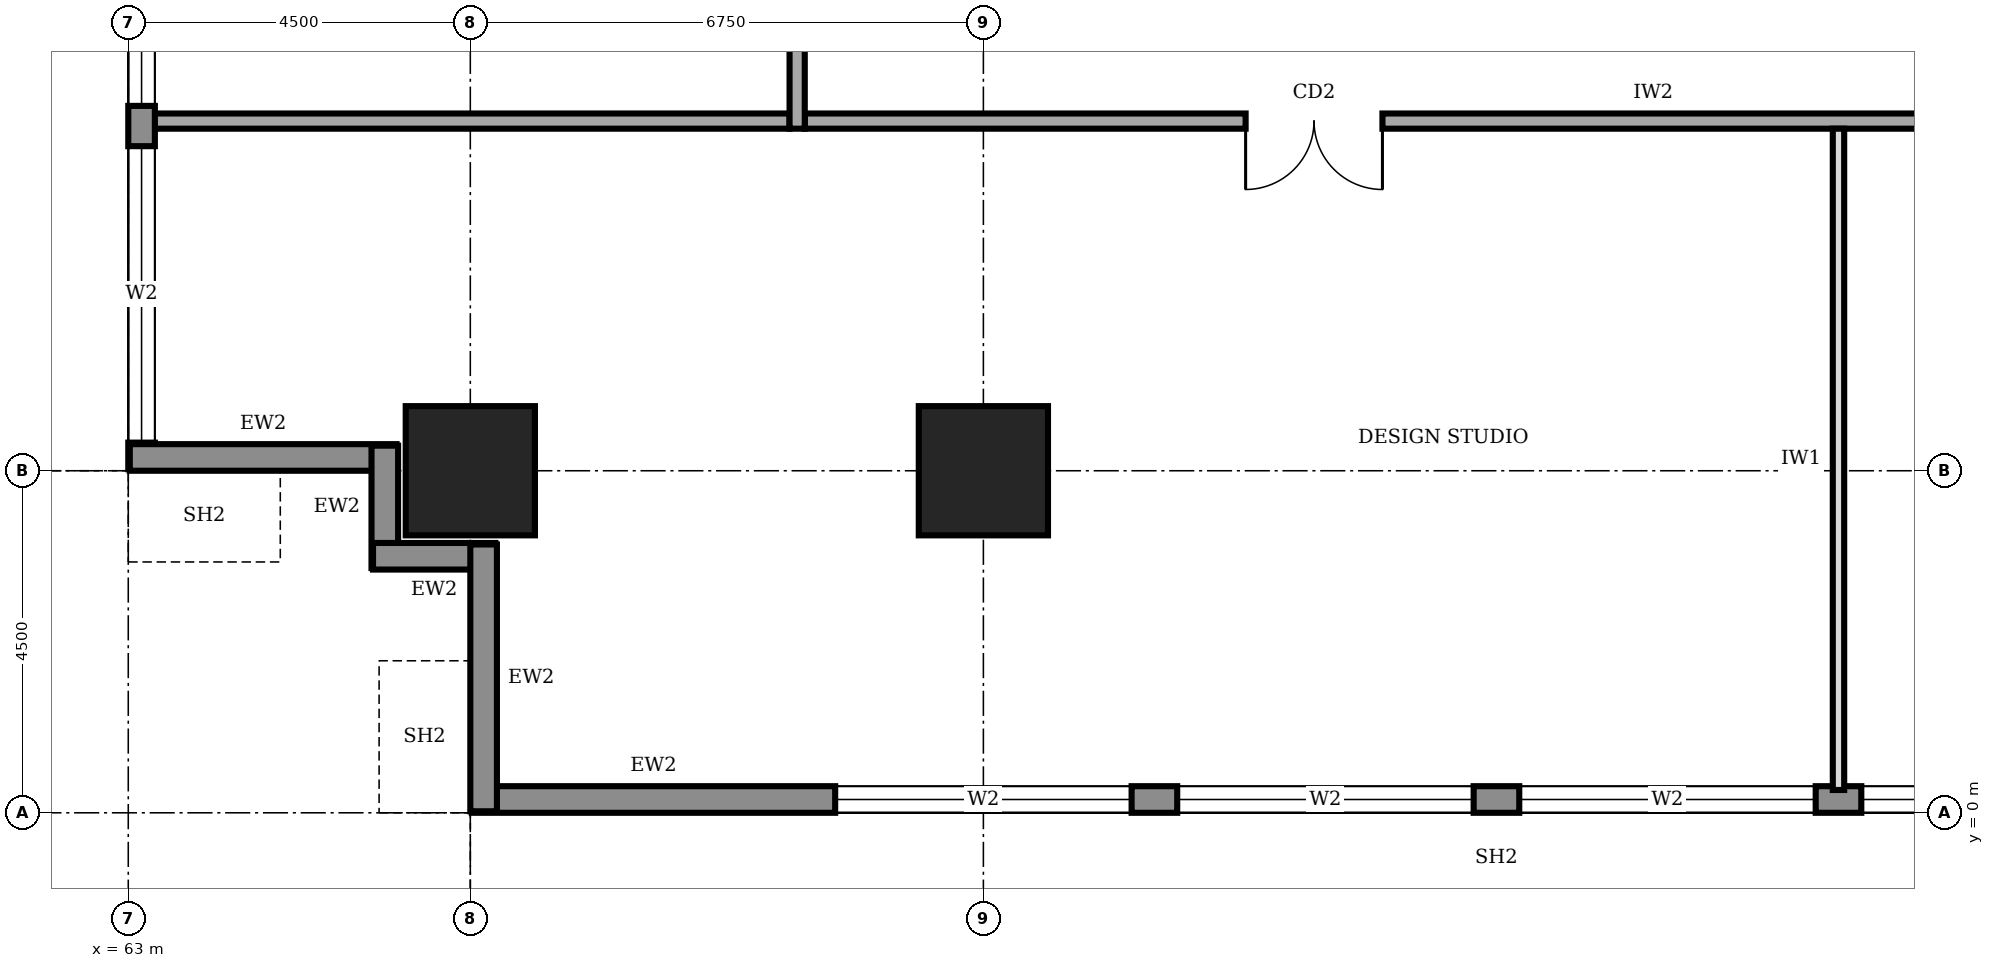
"""IFC4 building model, lengths in metres.
Left out: names, types, materials, properties, quantities, classifications, styles, units other than length and angle.
Written with IfcOpenShell. Run it as: python <this file> out.ifc"""

import sys

from ifc_helpers import new_model, si_unit, direction, frame, frame_2d, origin, origin_2d, place, context, subcontext, project, spatial, rectangle, extrude, element, fill, save


model = new_model("IFC4")
c1 = context("Model", 3, precision=1e-05, world=origin(), true_north=direction((0.0, 1.0)))
c2 = subcontext(c1, "Body", "Model", "MODEL_VIEW")
j1 = project(units=[si_unit("LENGTHUNIT", "METRE"), si_unit("PLANEANGLEUNIT", "RADIAN")], contexts=[c1])
p1 = place(None, origin())
s1 = spatial("IfcSite", under=j1, at=p1, CompositionType="ELEMENT")
p2 = place(p1, origin())
s2 = spatial("IfcBuilding", under=s1, at=p2, CompositionType="ELEMENT")
p3 = place(p2, frame((0.0, 0.0, 49.0)))
s3 = spatial("IfcBuildingStorey", under=s2, at=p3, CompositionType="ELEMENT", Elevation=49.0)
for number, where, z_axis, x_axis in (
    (1, (67.5, 4.5, 0.0), (0.0, 0.0, 1.0), (1.0, 0.0, 0.0)),
    (2, (74.25, 4.5, 0.0), (0.0, 0.0, 1.0), (1.0, 0.0, 0.0)),
):
    element("IfcColumn", number, at=place(p3, frame(where, z_axis=z_axis, x_axis=x_axis)), inside=s3, PredefinedType="COLUMN", context=c2, shape_type="SweptSolid", body=[
        extrude(rectangle(XDim=1.7, YDim=1.7, at=origin_2d()), origin(), (0.0, 0.0, 1.0), 4.0),
    ])
p4 = place(p3, frame((67.52, 0.175, 0.0), z_axis=(0.0, 0.0, 1.0), x_axis=(1.0, 0.0, 0.0)))
e3 = element("IfcWall", 3, at=p4, inside=s3, PredefinedType="STANDARD", context=c2, shape_type="SweptSolid", body=[
    extrude(rectangle(XDim=26.96, YDim=0.35, at=frame_2d((13.48, 0.0))), origin(), (0.0, 0.0, 1.0), 3.75),
])
p5 = place(p4, frame((4.78, 0.0, 0.6)))
e4 = element("IfcOpeningElement", 4, at=p5, cuts=e3, PredefinedType="OPENING", context=c2, shape_type="SweptSolid", body=[
    extrude(rectangle(XDim=3.9, YDim=2.6, at=frame_2d((1.95, 1.3))), frame((0.0, 0.185, 0.0), z_axis=(0.0, -1.0, 0.0), x_axis=(1.0, 0.0, 0.0)), (0.0, 0.0, 1.0), 0.37),
])
p6 = place(p4, frame((9.28, 0.0, 0.6)))
e5 = element("IfcOpeningElement", 5, at=p6, cuts=e3, PredefinedType="OPENING", context=c2, shape_type="SweptSolid", body=[
    extrude(rectangle(XDim=3.9, YDim=2.6, at=frame_2d((1.95, 1.3))), frame((0.0, 0.185, 0.0), z_axis=(0.0, -1.0, 0.0), x_axis=(1.0, 0.0, 0.0)), (0.0, 0.0, 1.0), 0.37),
])
p7 = place(p4, frame((13.78, 0.0, 0.6)))
e6 = element("IfcOpeningElement", 6, at=p7, cuts=e3, PredefinedType="OPENING", context=c2, shape_type="SweptSolid", body=[
    extrude(rectangle(XDim=3.9, YDim=2.6, at=frame_2d((1.95, 1.3))), frame((0.0, 0.185, 0.0), z_axis=(0.0, -1.0, 0.0), x_axis=(1.0, 0.0, 0.0)), (0.0, 0.0, 1.0), 0.37),
])
p8 = place(p4, frame((18.28, 0.0, 0.6)))
e7 = element("IfcOpeningElement", 7, at=p8, cuts=e3, PredefinedType="OPENING", context=c2, shape_type="SweptSolid", body=[
    extrude(rectangle(XDim=3.9, YDim=2.6, at=frame_2d((1.95, 1.3))), frame((0.0, 0.185, 0.0), z_axis=(0.0, -1.0, 0.0), x_axis=(1.0, 0.0, 0.0)), (0.0, 0.0, 1.0), 0.37),
])
p9 = place(p4, frame((22.71, 0.0, 0.6)))
e8 = element("IfcOpeningElement", 8, at=p9, cuts=e3, PredefinedType="OPENING", context=c2, shape_type="SweptSolid", body=[
    extrude(rectangle(XDim=3.9, YDim=2.6, at=frame_2d((1.95, 1.3))), frame((0.0, 0.185, 0.0), z_axis=(0.0, -1.0, 0.0), x_axis=(1.0, 0.0, 0.0)), (0.0, 0.0, 1.0), 0.37),
])
p10 = place(p3, frame((63.175, 35.98, 0.0), z_axis=(0.0, 0.0, 1.0), x_axis=(0.0, -1.0, 0.0)))
e9 = element("IfcWall", 9, at=p10, inside=s3, PredefinedType="STANDARD", context=c2, shape_type="SweptSolid", body=[
    extrude(rectangle(XDim=31.46, YDim=0.35, at=frame_2d((15.73, 0.0))), origin(), (0.0, 0.0, 1.0), 3.75),
])
p11 = place(p10, frame((27.21, 0.0, 0.6)))
e10 = element("IfcOpeningElement", 10, at=p11, cuts=e9, PredefinedType="OPENING", context=c2, shape_type="SweptSolid", body=[
    extrude(rectangle(XDim=3.9, YDim=2.6, at=frame_2d((1.95, 1.3))), frame((0.0, 0.185, 0.0), z_axis=(0.0, -1.0, 0.0), x_axis=(1.0, 0.0, 0.0)), (0.0, 0.0, 1.0), 0.37),
])
p12 = place(p10, frame((22.78, 0.0, 0.6)))
e11 = element("IfcOpeningElement", 11, at=p12, cuts=e9, PredefinedType="OPENING", context=c2, shape_type="SweptSolid", body=[
    extrude(rectangle(XDim=3.9, YDim=2.6, at=frame_2d((1.95, 1.3))), frame((0.0, 0.185, 0.0), z_axis=(0.0, -1.0, 0.0), x_axis=(1.0, 0.0, 0.0)), (0.0, 0.0, 1.0), 0.37),
])
p13 = place(p10, frame((18.28, 0.0, 0.6)))
e12 = element("IfcOpeningElement", 12, at=p13, cuts=e9, PredefinedType="OPENING", context=c2, shape_type="SweptSolid", body=[
    extrude(rectangle(XDim=3.9, YDim=2.6, at=frame_2d((1.95, 1.3))), frame((0.0, 0.185, 0.0), z_axis=(0.0, -1.0, 0.0), x_axis=(1.0, 0.0, 0.0)), (0.0, 0.0, 1.0), 0.37),
])
p14 = place(p10, frame((13.78, 0.0, 0.6)))
e13 = element("IfcOpeningElement", 13, at=p14, cuts=e9, PredefinedType="OPENING", context=c2, shape_type="SweptSolid", body=[
    extrude(rectangle(XDim=3.9, YDim=2.6, at=frame_2d((1.95, 1.3))), frame((0.0, 0.185, 0.0), z_axis=(0.0, -1.0, 0.0), x_axis=(1.0, 0.0, 0.0)), (0.0, 0.0, 1.0), 0.37),
])
p15 = place(p10, frame((9.28, 0.0, 0.6)))
e14 = element("IfcOpeningElement", 14, at=p15, cuts=e9, PredefinedType="OPENING", context=c2, shape_type="SweptSolid", body=[
    extrude(rectangle(XDim=3.9, YDim=2.6, at=frame_2d((1.95, 1.3))), frame((0.0, 0.185, 0.0), z_axis=(0.0, -1.0, 0.0), x_axis=(1.0, 0.0, 0.0)), (0.0, 0.0, 1.0), 0.37),
])
p16 = place(p10, frame((4.78, 0.0, 0.6)))
e15 = element("IfcOpeningElement", 15, at=p16, cuts=e9, PredefinedType="OPENING", context=c2, shape_type="SweptSolid", body=[
    extrude(rectangle(XDim=3.9, YDim=2.6, at=frame_2d((1.95, 1.3))), frame((0.0, 0.185, 0.0), z_axis=(0.0, -1.0, 0.0), x_axis=(1.0, 0.0, 0.0)), (0.0, 0.0, 1.0), 0.37),
])
p17 = place(p3, frame((63.02, 4.675, 0.0), z_axis=(0.0, 0.0, 1.0), x_axis=(1.0, 0.0, 0.0)))
e16 = element("IfcWall", 16, at=p17, inside=s3, PredefinedType="STANDARD", context=c2, shape_type="SweptSolid", body=[
    extrude(rectangle(XDim=3.51, YDim=0.35, at=frame_2d((1.755, 0.0))), origin(), (0.0, 0.0, 1.0), 2.85),
])
for number, where, z_axis, x_axis in (
    (17, (66.375, 4.83, 0.0), (0.0, 0.0, 1.0), (0.0, -1.0, 0.0)),
    (18, (66.22, 3.375, 0.0), (0.0, 0.0, 1.0), (1.0, 0.0, 0.0)),
):
    element("IfcWall", number, at=place(p3, frame(where, z_axis=z_axis, x_axis=x_axis)), inside=s3, PredefinedType="STANDARD", context=c2, shape_type="SweptSolid", body=[
        extrude(rectangle(XDim=1.61, YDim=0.35, at=frame_2d((0.805, 0.0))), origin(), (0.0, 0.0, 1.0), 3.75),
    ])
p18 = place(p3, frame((67.675, 3.53, 0.0), z_axis=(0.0, 0.0, 1.0), x_axis=(0.0, -1.0, 0.0)))
e19 = element("IfcWall", 19, at=p18, inside=s3, PredefinedType="STANDARD", context=c2, shape_type="SweptSolid", body=[
    extrude(rectangle(XDim=3.51, YDim=0.35, at=frame_2d((1.755, 0.0))), origin(), (0.0, 0.0, 1.0), 2.85),
])
p19 = place(p3, frame((71.9, 9.1, 0.0), z_axis=(0.0, 0.0, 1.0), x_axis=(1.0, 0.0, 0.0)))
e20 = element("IfcWall", 20, at=p19, inside=s3, PredefinedType="SOLIDWALL", context=c2, shape_type="SweptSolid", body=[
    extrude(rectangle(XDim=17.65, YDim=0.2, at=frame_2d((8.825, 0.0))), origin(), (0.0, 0.0, 1.0), 3.75),
])
p20 = place(p19, frame((5.8, 0.0, 0.0)))
e21 = element("IfcOpeningElement", 21, at=p20, cuts=e20, PredefinedType="OPENING", context=c2, shape_type="SweptSolid", body=[
    extrude(rectangle(XDim=1.8, YDim=2.1, at=frame_2d((0.9, 1.05))), frame((0.0, 0.11, 0.0), z_axis=(0.0, -1.0, 0.0), x_axis=(1.0, 0.0, 0.0)), (0.0, 0.0, 1.0), 0.22),
])
p21 = place(p19, frame((14.725, 0.0, 0.0)))
e22 = element("IfcOpeningElement", 22, at=p21, cuts=e20, PredefinedType="OPENING", context=c2, shape_type="SweptSolid", body=[
    extrude(rectangle(XDim=1.8, YDim=2.1, at=frame_2d((0.9, 1.05))), frame((0.0, 0.11, 0.0), z_axis=(0.0, -1.0, 0.0), x_axis=(1.0, 0.0, 0.0)), (0.0, 0.0, 1.0), 0.22),
])
p22 = place(p3, frame((71.8, 32.05, 0.0), z_axis=(0.0, 0.0, 1.0), x_axis=(0.0, -1.0, 0.0)))
e23 = element("IfcWall", 23, at=p22, inside=s3, PredefinedType="SOLIDWALL", context=c2, shape_type="SweptSolid", body=[
    extrude(rectangle(XDim=23.05, YDim=0.2, at=frame_2d((11.525, 0.0))), origin(), (0.0, 0.0, 1.0), 3.75),
])
p23 = place(p22, frame((18.05, 0.0, 0.0)))
e24 = element("IfcOpeningElement", 24, at=p23, cuts=e23, PredefinedType="OPENING", context=c2, shape_type="SweptSolid", body=[
    extrude(rectangle(XDim=1.0, YDim=2.1, at=frame_2d((0.5, 1.05))), frame((0.0, 0.11, 0.0), z_axis=(0.0, -1.0, 0.0), x_axis=(1.0, 0.0, 0.0)), (0.0, 0.0, 1.0), 0.22),
])
p24 = place(p22, frame((11.3, 0.0, 0.0)))
e25 = element("IfcOpeningElement", 25, at=p24, cuts=e23, PredefinedType="OPENING", context=c2, shape_type="SweptSolid", body=[
    extrude(rectangle(XDim=1.0, YDim=2.1, at=frame_2d((0.5, 1.05))), frame((0.0, 0.11, 0.0), z_axis=(0.0, -1.0, 0.0), x_axis=(1.0, 0.0, 0.0)), (0.0, 0.0, 1.0), 0.22),
])
p25 = place(p22, frame((4.175, 0.0, 0.0)))
e26 = element("IfcOpeningElement", 26, at=p25, cuts=e23, PredefinedType="OPENING", context=c2, shape_type="SweptSolid", body=[
    extrude(rectangle(XDim=1.0, YDim=2.1, at=frame_2d((0.5, 1.05))), frame((0.0, 0.11, 0.0), z_axis=(0.0, -1.0, 0.0), x_axis=(1.0, 0.0, 0.0)), (0.0, 0.0, 1.0), 0.22),
])
p26 = place(p3, frame((63.3, 9.1, 0.0), z_axis=(0.0, 0.0, 1.0), x_axis=(1.0, 0.0, 0.0)))
e27 = element("IfcWall", 27, at=p26, inside=s3, PredefinedType="SOLIDWALL", context=c2, shape_type="SweptSolid", body=[
    extrude(rectangle(XDim=8.4, YDim=0.2, at=frame_2d((4.2, 0.0))), origin(), (0.0, 0.0, 1.0), 3.75),
])
p27 = place(p3, frame((85.5, 0.3, 0.0), z_axis=(0.0, 0.0, 1.0), x_axis=(0.0, 1.0, 0.0)))
e28 = element("IfcWall", 28, at=p27, inside=s3, PredefinedType="PARTITIONING", context=c2, shape_type="SweptSolid", body=[
    extrude(rectangle(XDim=8.7, YDim=0.15, at=frame_2d((4.35, 0.0))), origin(), (0.0, 0.0, 1.0), 3.75),
])
p28 = place(p5, origin())
e29 = element("IfcWindow", 29, at=p28, inside=s3, PartitioningType="SINGLE_PANEL", PredefinedType="WINDOW", context=c2, shape_type="SweptSolid", body=[
    extrude(rectangle(XDim=3.9, YDim=2.6, at=frame_2d((1.95, 1.3))), frame((0.0, 0.03, 0.0), z_axis=(0.0, -1.0, 0.0), x_axis=(1.0, 0.0, 0.0)), (0.0, 0.0, 1.0), 0.06),
])
fill(e4, e29)
p29 = place(p6, origin())
e30 = element("IfcWindow", 30, at=p29, inside=s3, PartitioningType="SINGLE_PANEL", PredefinedType="WINDOW", context=c2, shape_type="SweptSolid", body=[
    extrude(rectangle(XDim=3.9, YDim=2.6, at=frame_2d((1.95, 1.3))), frame((0.0, 0.03, 0.0), z_axis=(0.0, -1.0, 0.0), x_axis=(1.0, 0.0, 0.0)), (0.0, 0.0, 1.0), 0.06),
])
fill(e5, e30)
p30 = place(p7, origin())
e31 = element("IfcWindow", 31, at=p30, inside=s3, PartitioningType="SINGLE_PANEL", PredefinedType="WINDOW", context=c2, shape_type="SweptSolid", body=[
    extrude(rectangle(XDim=3.9, YDim=2.6, at=frame_2d((1.95, 1.3))), frame((0.0, 0.03, 0.0), z_axis=(0.0, -1.0, 0.0), x_axis=(1.0, 0.0, 0.0)), (0.0, 0.0, 1.0), 0.06),
])
fill(e6, e31)
p31 = place(p8, origin())
e32 = element("IfcWindow", 32, at=p31, inside=s3, PartitioningType="SINGLE_PANEL", PredefinedType="WINDOW", context=c2, shape_type="SweptSolid", body=[
    extrude(rectangle(XDim=3.9, YDim=2.6, at=frame_2d((1.95, 1.3))), frame((0.0, 0.03, 0.0), z_axis=(0.0, -1.0, 0.0), x_axis=(1.0, 0.0, 0.0)), (0.0, 0.0, 1.0), 0.06),
])
fill(e7, e32)
p32 = place(p11, origin())
e33 = element("IfcWindow", 33, at=p32, inside=s3, PartitioningType="SINGLE_PANEL", PredefinedType="WINDOW", context=c2, shape_type="SweptSolid", body=[
    extrude(rectangle(XDim=3.9, YDim=2.6, at=frame_2d((1.95, 1.3))), frame((0.0, 0.03, 0.0), z_axis=(0.0, -1.0, 0.0), x_axis=(1.0, 0.0, 0.0)), (0.0, 0.0, 1.0), 0.06),
])
fill(e10, e33)
p33 = place(p12, origin())
e34 = element("IfcWindow", 34, at=p33, inside=s3, PartitioningType="SINGLE_PANEL", PredefinedType="WINDOW", context=c2, shape_type="SweptSolid", body=[
    extrude(rectangle(XDim=3.9, YDim=2.6, at=frame_2d((1.95, 1.3))), frame((0.0, 0.03, 0.0), z_axis=(0.0, -1.0, 0.0), x_axis=(1.0, 0.0, 0.0)), (0.0, 0.0, 1.0), 0.06),
])
fill(e11, e34)
p34 = place(p20, frame((1.8, 0.0, 0.0), z_axis=(0.0, 0.0, 1.0), x_axis=(-1.0, 0.0, 0.0)))
e35 = element("IfcDoor", 35, at=p34, inside=s3, OperationType="DOUBLE_DOOR_SINGLE_SWING", PredefinedType="DOOR", context=c2, shape_type="SweptSolid", body=[
    extrude(rectangle(XDim=1.8, YDim=2.1, at=frame_2d((0.9, 1.05))), frame((0.0, 0.025, 0.0), z_axis=(0.0, -1.0, 0.0), x_axis=(1.0, 0.0, 0.0)), (0.0, 0.0, 1.0), 0.05),
])
fill(e21, e35)
save(model, sys.argv[1])
